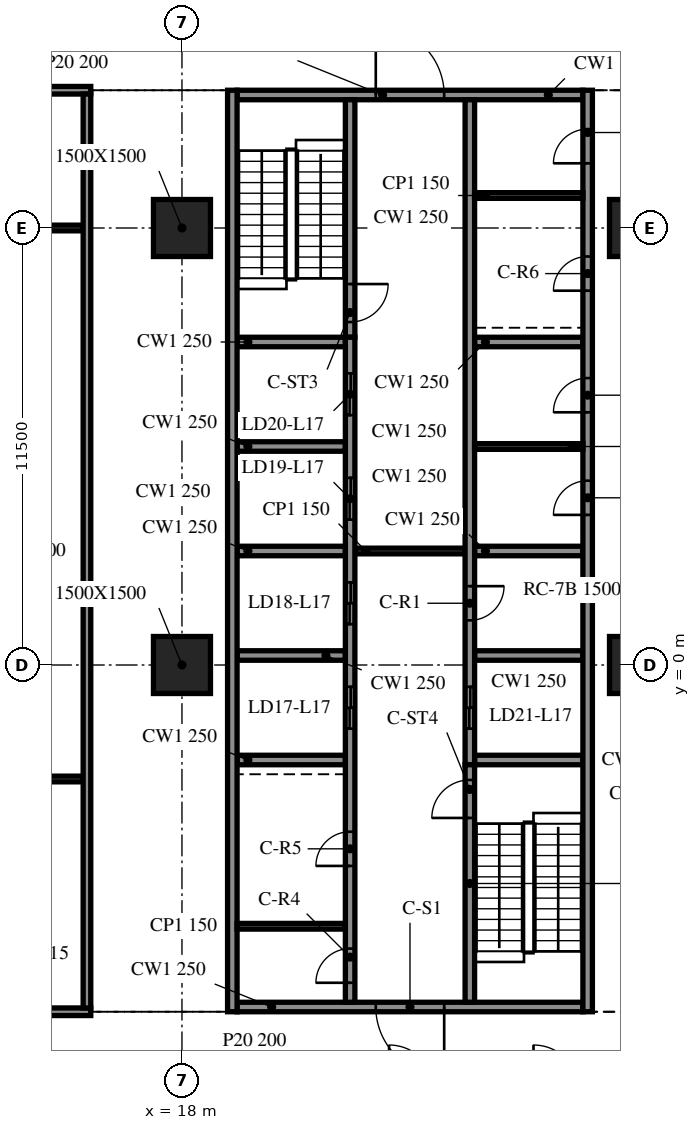
"""IFC4 building model, lengths in metres.
Left out: names, types, materials, properties, quantities, classifications, styles, units other than length and angle.
Written with IfcOpenShell. Run it as: python <this file> out.ifc"""

import sys

from ifc_helpers import new_model, si_unit, direction, frame, frame_2d, origin, origin_2d, place, context, subcontext, project, spatial, rectangle, extrude, element, fill, save


model = new_model("IFC4")
c1 = context("Model", 3, precision=1e-05, world=origin(), true_north=direction((0.0, 1.0)))
c2 = subcontext(c1, "Body", "Model", "MODEL_VIEW")
j1 = project(units=[si_unit("LENGTHUNIT", "METRE"), si_unit("PLANEANGLEUNIT", "RADIAN")], contexts=[c1])
p1 = place(None, origin())
s1 = spatial("IfcSite", under=j1, at=p1, CompositionType="ELEMENT")
p2 = place(p1, origin())
s2 = spatial("IfcBuilding", under=s1, at=p2, CompositionType="ELEMENT")
p3 = place(p2, frame((0.0, 0.0, 76.1)))
s3 = spatial("IfcBuildingStorey", under=s2, at=p3, CompositionType="ELEMENT", Elevation=76.1)
for number, where, z_axis, x_axis in (
    (1, (18.0, 0.0, -0.34), (0.0, 0.0, 1.0), (1.0, 0.0, 0.0)),
    (2, (18.0, 11.5, -0.34), (0.0, 0.0, 1.0), (1.0, 0.0, 0.0)),
    (3, (30.0, 0.0, -0.34), (0.0, 0.0, 1.0), (1.0, 0.0, 0.0)),
    (4, (30.0, 11.5, -0.34), (0.0, 0.0, 1.0), (1.0, 0.0, 0.0)),
):
    element("IfcColumn", number, at=place(p3, frame(where, z_axis=z_axis, x_axis=x_axis)), inside=s3, PredefinedType="COLUMN", context=c2, shape_type="SweptSolid", body=[
        extrude(rectangle(XDim=1.5, YDim=1.5, at=origin_2d()), origin(), (0.0, 0.0, 1.0), 4.09),
    ])
p4 = place(p3, frame((19.325, 15.125, 0.0), z_axis=(0.0, 0.0, 1.0), x_axis=(0.0, -1.0, 0.0)))
e5 = element("IfcWall", 5, at=p4, inside=s3, PredefinedType="SOLIDWALL", context=c2, shape_type="SweptSolid", body=[
    extrude(rectangle(XDim=24.25, YDim=0.25, at=frame_2d((12.125, 0.0))), origin(), (0.0, 0.0, 1.0), 3.75),
])
p5 = place(p3, frame((28.675, -9.125, 0.0), z_axis=(0.0, 0.0, 1.0), x_axis=(0.0, 1.0, 0.0)))
e6 = element("IfcWall", 6, at=p5, inside=s3, PredefinedType="SOLIDWALL", context=c2, shape_type="SweptSolid", body=[
    extrude(rectangle(XDim=24.25, YDim=0.25, at=frame_2d((12.125, 0.0))), origin(), (0.0, 0.0, 1.0), 3.75),
])
p6 = place(p5, frame((13.075, 0.0, 0.0)))
e7 = element("IfcOpeningElement", 7, at=p6, cuts=e6, PredefinedType="OPENING", context=c2, shape_type="SweptSolid", body=[
    extrude(rectangle(XDim=0.9, YDim=2.1, at=frame_2d((0.45, 1.05))), frame((0.0, 0.135, 0.0), z_axis=(0.0, -1.0, 0.0), x_axis=(1.0, 0.0, 0.0)), (0.0, 0.0, 1.0), 0.27),
])
p7 = place(p5, frame((15.775, 0.0, 0.0)))
e8 = element("IfcOpeningElement", 8, at=p7, cuts=e6, PredefinedType="OPENING", context=c2, shape_type="SweptSolid", body=[
    extrude(rectangle(XDim=0.9, YDim=2.1, at=frame_2d((0.45, 1.05))), frame((0.0, 0.135, 0.0), z_axis=(0.0, -1.0, 0.0), x_axis=(1.0, 0.0, 0.0)), (0.0, 0.0, 1.0), 0.27),
])
p8 = place(p5, frame((18.975, 0.0, 0.0)))
e9 = element("IfcOpeningElement", 9, at=p8, cuts=e6, PredefinedType="OPENING", context=c2, shape_type="SweptSolid", body=[
    extrude(rectangle(XDim=0.9, YDim=2.1, at=frame_2d((0.45, 1.05))), frame((0.0, 0.135, 0.0), z_axis=(0.0, -1.0, 0.0), x_axis=(1.0, 0.0, 0.0)), (0.0, 0.0, 1.0), 0.27),
])
p9 = place(p5, frame((22.327, 0.0, 0.0)))
e10 = element("IfcOpeningElement", 10, at=p9, cuts=e6, PredefinedType="OPENING", context=c2, shape_type="SweptSolid", body=[
    extrude(rectangle(XDim=0.9, YDim=2.1, at=frame_2d((0.45, 1.05))), frame((0.0, 0.135, 0.0), z_axis=(0.0, -1.0, 0.0), x_axis=(1.0, 0.0, 0.0)), (0.0, 0.0, 1.0), 0.27),
])
p10 = place(p3, frame((28.55, -9.0, 0.0), z_axis=(0.0, 0.0, 1.0), x_axis=(-1.0, 0.0, 0.0)))
e11 = element("IfcWall", 11, at=p10, inside=s3, PredefinedType="SOLIDWALL", context=c2, shape_type="SweptSolid", body=[
    extrude(rectangle(XDim=9.1, YDim=0.25, at=frame_2d((4.55, 0.0))), origin(), (0.0, 0.0, 1.0), 3.75),
])
p11 = place(p10, frame((3.65, 0.0, 0.0)))
e12 = element("IfcOpeningElement", 12, at=p11, cuts=e11, PredefinedType="OPENING", context=c2, shape_type="SweptSolid", body=[
    extrude(rectangle(XDim=1.8, YDim=2.1, at=frame_2d((0.9, 1.05))), frame((0.0, 0.135, 0.0), z_axis=(0.0, -1.0, 0.0), x_axis=(1.0, 0.0, 0.0)), (0.0, 0.0, 1.0), 0.27),
])
p12 = place(p3, frame((19.45, 15.0, 0.0), z_axis=(0.0, 0.0, 1.0), x_axis=(1.0, 0.0, 0.0)))
e13 = element("IfcWall", 13, at=p12, inside=s3, PredefinedType="SOLIDWALL", context=c2, shape_type="SweptSolid", body=[
    extrude(rectangle(XDim=9.1, YDim=0.25, at=frame_2d((4.55, 0.0))), origin(), (0.0, 0.0, 1.0), 3.75),
])
p13 = place(p12, frame((3.65, 0.0, 0.0)))
e14 = element("IfcOpeningElement", 14, at=p13, cuts=e13, PredefinedType="OPENING", context=c2, shape_type="SweptSolid", body=[
    extrude(rectangle(XDim=1.8, YDim=2.1, at=frame_2d((0.9, 1.05))), frame((0.0, 0.135, 0.0), z_axis=(0.0, -1.0, 0.0), x_axis=(1.0, 0.0, 0.0)), (0.0, 0.0, 1.0), 0.27),
])
p14 = place(p3, frame((22.425, -8.875, 0.0), z_axis=(0.0, 0.0, 1.0), x_axis=(0.0, 1.0, 0.0)))
e15 = element("IfcWall", 15, at=p14, inside=s3, PredefinedType="SOLIDWALL", context=c2, shape_type="SweptSolid", body=[
    extrude(rectangle(XDim=17.5, YDim=0.25, at=frame_2d((8.75, 0.0))), origin(), (0.0, 0.0, 1.0), 3.75),
])
p15 = place(p14, frame((7.2, 0.0, 0.0)))
e16 = element("IfcOpeningElement", 16, at=p15, cuts=e15, PredefinedType="OPENING", context=c2, shape_type="SweptSolid", body=[
    extrude(rectangle(XDim=1.1, YDim=2.1, at=frame_2d((0.55, 1.05))), frame((0.0, 0.135, 0.0), z_axis=(0.0, -1.0, 0.0), x_axis=(1.0, 0.0, 0.0)), (0.0, 0.0, 1.0), 0.27),
])
p16 = place(p14, frame((9.95, 0.0, 0.0)))
e17 = element("IfcOpeningElement", 17, at=p16, cuts=e15, PredefinedType="OPENING", context=c2, shape_type="SweptSolid", body=[
    extrude(rectangle(XDim=1.1, YDim=2.1, at=frame_2d((0.55, 1.05))), frame((0.0, 0.135, 0.0), z_axis=(0.0, -1.0, 0.0), x_axis=(1.0, 0.0, 0.0)), (0.0, 0.0, 1.0), 0.27),
])
p17 = place(p14, frame((12.7, 0.0, 0.0)))
e18 = element("IfcOpeningElement", 18, at=p17, cuts=e15, PredefinedType="OPENING", context=c2, shape_type="SweptSolid", body=[
    extrude(rectangle(XDim=1.1, YDim=2.1, at=frame_2d((0.55, 1.05))), frame((0.0, 0.135, 0.0), z_axis=(0.0, -1.0, 0.0), x_axis=(1.0, 0.0, 0.0)), (0.0, 0.0, 1.0), 0.27),
])
p18 = place(p14, frame((15.45, 0.0, 0.0)))
e19 = element("IfcOpeningElement", 19, at=p18, cuts=e15, PredefinedType="OPENING", context=c2, shape_type="SweptSolid", body=[
    extrude(rectangle(XDim=1.1, YDim=2.1, at=frame_2d((0.55, 1.05))), frame((0.0, 0.135, 0.0), z_axis=(0.0, -1.0, 0.0), x_axis=(1.0, 0.0, 0.0)), (0.0, 0.0, 1.0), 0.27),
])
p19 = place(p14, frame((0.512, 0.0, 0.0)))
e20 = element("IfcOpeningElement", 20, at=p19, cuts=e15, PredefinedType="OPENING", context=c2, shape_type="SweptSolid", body=[
    extrude(rectangle(XDim=0.9, YDim=2.1, at=frame_2d((0.45, 1.05))), frame((0.0, 0.135, 0.0), z_axis=(0.0, -1.0, 0.0), x_axis=(1.0, 0.0, 0.0)), (0.0, 0.0, 1.0), 0.27),
])
p20 = place(p14, frame((3.587, 0.0, 0.0)))
e21 = element("IfcOpeningElement", 21, at=p20, cuts=e15, PredefinedType="OPENING", context=c2, shape_type="SweptSolid", body=[
    extrude(rectangle(XDim=0.9, YDim=2.1, at=frame_2d((0.45, 1.05))), frame((0.0, 0.135, 0.0), z_axis=(0.0, -1.0, 0.0), x_axis=(1.0, 0.0, 0.0)), (0.0, 0.0, 1.0), 0.27),
])
p21 = place(p3, frame((22.425, 14.875, 0.0), z_axis=(0.0, 0.0, 1.0), x_axis=(0.0, -1.0, 0.0)))
e22 = element("IfcWall", 22, at=p21, inside=s3, PredefinedType="SOLIDWALL", context=c2, shape_type="SweptSolid", body=[
    extrude(rectangle(XDim=6.25, YDim=0.25, at=frame_2d((3.125, 0.0))), origin(), (0.0, 0.0, 1.0), 3.75),
])
p22 = place(p21, frame((4.85, 0.0, 0.0)))
e23 = element("IfcOpeningElement", 23, at=p22, cuts=e22, PredefinedType="OPENING", context=c2, shape_type="SweptSolid", body=[
    extrude(rectangle(XDim=1.0, YDim=2.1, at=frame_2d((0.5, 1.05))), frame((0.0, 0.135, 0.0), z_axis=(0.0, -1.0, 0.0), x_axis=(1.0, 0.0, 0.0)), (0.0, 0.0, 1.0), 0.27),
])
p23 = place(p3, frame((25.575, -8.875, 0.0), z_axis=(0.0, 0.0, 1.0), x_axis=(0.0, 1.0, 0.0)))
e24 = element("IfcWall", 24, at=p23, inside=s3, PredefinedType="SOLIDWALL", context=c2, shape_type="SweptSolid", body=[
    extrude(rectangle(XDim=6.25, YDim=0.25, at=frame_2d((3.125, 0.0))), origin(), (0.0, 0.0, 1.0), 3.75),
])
p24 = place(p23, frame((4.85, 0.0, 0.0)))
e25 = element("IfcOpeningElement", 25, at=p24, cuts=e24, PredefinedType="OPENING", context=c2, shape_type="SweptSolid", body=[
    extrude(rectangle(XDim=1.0, YDim=2.1, at=frame_2d((0.5, 1.05))), frame((0.0, 0.135, 0.0), z_axis=(0.0, -1.0, 0.0), x_axis=(1.0, 0.0, 0.0)), (0.0, 0.0, 1.0), 0.27),
])
p25 = place(p3, frame((25.575, 14.875, 0.0), z_axis=(0.0, 0.0, 1.0), x_axis=(0.0, -1.0, 0.0)))
e26 = element("IfcWall", 26, at=p25, inside=s3, PredefinedType="SOLIDWALL", context=c2, shape_type="SweptSolid", body=[
    extrude(rectangle(XDim=17.5, YDim=0.25, at=frame_2d((8.75, 0.0))), origin(), (0.0, 0.0, 1.0), 3.75),
])
p26 = place(p25, frame((15.45, 0.0, 0.0)))
e27 = element("IfcOpeningElement", 27, at=p26, cuts=e26, PredefinedType="OPENING", context=c2, shape_type="SweptSolid", body=[
    extrude(rectangle(XDim=1.1, YDim=2.1, at=frame_2d((0.55, 1.05))), frame((0.0, 0.135, 0.0), z_axis=(0.0, -1.0, 0.0), x_axis=(1.0, 0.0, 0.0)), (0.0, 0.0, 1.0), 0.27),
])
p27 = place(p25, frame((12.8, 0.0, 0.0)))
e28 = element("IfcOpeningElement", 28, at=p27, cuts=e26, PredefinedType="OPENING", context=c2, shape_type="SweptSolid", body=[
    extrude(rectangle(XDim=0.9, YDim=2.1, at=frame_2d((0.45, 1.05))), frame((0.0, 0.135, 0.0), z_axis=(0.0, -1.0, 0.0), x_axis=(1.0, 0.0, 0.0)), (0.0, 0.0, 1.0), 0.27),
])
for number, where, z_axis, x_axis in (
    (29, (19.45, -2.5, 0.0), (0.0, 0.0, 1.0), (1.0, 0.0, 0.0)),
    (30, (19.45, 0.25, 0.0), (0.0, 0.0, 1.0), (1.0, 0.0, 0.0)),
    (31, (19.45, 3.0, 0.0), (0.0, 0.0, 1.0), (1.0, 0.0, 0.0)),
    (32, (19.45, 5.75, 0.0), (0.0, 0.0, 1.0), (1.0, 0.0, 0.0)),
    (33, (19.45, 8.5, 0.0), (0.0, 0.0, 1.0), (1.0, 0.0, 0.0)),
    (34, (25.7, -2.5, 0.0), (0.0, 0.0, 1.0), (1.0, 0.0, 0.0)),
    (35, (25.7, 0.25, 0.0), (0.0, 0.0, 1.0), (1.0, 0.0, 0.0)),
    (36, (25.7, 3.0, 0.0), (0.0, 0.0, 1.0), (1.0, 0.0, 0.0)),
    (37, (25.7, 8.5, 0.0), (0.0, 0.0, 1.0), (1.0, 0.0, 0.0)),
):
    element("IfcWall", number, at=place(p3, frame(where, z_axis=z_axis, x_axis=x_axis)), inside=s3, PredefinedType="SOLIDWALL", context=c2, shape_type="SweptSolid", body=[
        extrude(rectangle(XDim=2.85, YDim=0.25, at=frame_2d((1.425, 0.0))), origin(), (0.0, 0.0, 1.0), 3.75),
    ])
p28 = place(p3, frame((22.55, 3.0, 0.0), z_axis=(0.0, 0.0, 1.0), x_axis=(1.0, 0.0, 0.0)))
e38 = element("IfcWall", 38, at=p28, inside=s3, PredefinedType="PARTITIONING", context=c2, shape_type="SweptSolid", body=[
    extrude(rectangle(XDim=2.9, YDim=0.15, at=frame_2d((1.45, 0.0))), origin(), (0.0, 0.0, 1.0), 3.75),
])
for number, where, z_axis, x_axis in (
    (39, (25.7, 5.75, 0.0), (0.0, 0.0, 1.0), (1.0, 0.0, 0.0)),
    (40, (19.45, -6.875, 0.0), (0.0, 0.0, 1.0), (1.0, 0.0, 0.0)),
    (41, (25.7, 12.355, 0.0), (0.0, 0.0, 1.0), (1.0, 0.0, 0.0)),
):
    element("IfcWall", number, at=place(p3, frame(where, z_axis=z_axis, x_axis=x_axis)), inside=s3, PredefinedType="PARTITIONING", context=c2, shape_type="SweptSolid", body=[
        extrude(rectangle(XDim=2.85, YDim=0.15, at=frame_2d((1.425, 0.0))), origin(), (0.0, 0.0, 1.0), 3.75),
    ])
p29 = place(p3, frame((8.3, -9.125, 0.0), z_axis=(0.0, 0.0, 1.0), x_axis=(1.0, 0.0, 0.0)))
e42 = element("IfcWall", 42, at=p29, inside=s3, PredefinedType="PARTITIONING", context=c2, shape_type="SweptSolid", body=[
    extrude(rectangle(XDim=7.3, YDim=0.2, at=frame_2d((3.65, 0.0))), origin(), (0.0, 0.0, 1.0), 3.75),
])
p30 = place(p29, frame((3.1, 0.0, 0.0)))
e43 = element("IfcOpeningElement", 43, at=p30, cuts=e42, PredefinedType="OPENING", context=c2, shape_type="SweptSolid", body=[
    extrude(rectangle(XDim=1.0, YDim=2.1, at=frame_2d((0.5, 1.05))), frame((0.0, 0.11, 0.0), z_axis=(0.0, -1.0, 0.0), x_axis=(1.0, 0.0, 0.0)), (0.0, 0.0, 1.0), 0.22),
])
for number, where, z_axis, x_axis in (
    (44, (8.5, -3.0, 0.0), (0.0, 0.0, 1.0), (1.0, 0.0, 0.0)),
    (45, (8.5, 11.5, 0.0), (0.0, 0.0, 1.0), (1.0, 0.0, 0.0)),
):
    element("IfcWall", number, at=place(p3, frame(where, z_axis=z_axis, x_axis=x_axis)), inside=s3, PredefinedType="PARTITIONING", context=c2, shape_type="SweptSolid", body=[
        extrude(rectangle(XDim=6.9, YDim=0.15, at=frame_2d((3.45, 0.0))), origin(), (0.0, 0.0, 1.0), 3.75),
    ])
p31 = place(p3, frame((8.3, 15.125, 0.0), z_axis=(0.0, 0.0, 1.0), x_axis=(1.0, 0.0, 0.0)))
e46 = element("IfcWall", 46, at=p31, inside=s3, PredefinedType="PARTITIONING", context=c2, shape_type="SweptSolid", body=[
    extrude(rectangle(XDim=7.3, YDim=0.2, at=frame_2d((3.65, 0.0))), origin(), (0.0, 0.0, 1.0), 3.75),
])
p32 = place(p31, frame((3.1, 0.0, 0.0)))
e47 = element("IfcOpeningElement", 47, at=p32, cuts=e46, PredefinedType="OPENING", context=c2, shape_type="SweptSolid", body=[
    extrude(rectangle(XDim=1.0, YDim=2.1, at=frame_2d((0.5, 1.05))), frame((0.0, 0.11, 0.0), z_axis=(0.0, -1.0, 0.0), x_axis=(1.0, 0.0, 0.0)), (0.0, 0.0, 1.0), 0.22),
])
p33 = place(p3, frame((15.5, -9.025, 0.0), z_axis=(0.0, 0.0, 1.0), x_axis=(0.0, 1.0, 0.0)))
e48 = element("IfcWall", 48, at=p33, inside=s3, PredefinedType="PARTITIONING", context=c2, shape_type="SweptSolid", body=[
    extrude(rectangle(XDim=24.05, YDim=0.2, at=frame_2d((12.025, 0.0))), origin(), (0.0, 0.0, 1.0), 3.75),
])
p34 = place(p11, origin())
e49 = element("IfcDoor", 49, at=p34, inside=s3, OperationType="DOUBLE_DOOR_SINGLE_SWING", PredefinedType="DOOR", context=c2, shape_type="SweptSolid", body=[
    extrude(rectangle(XDim=1.8, YDim=2.1, at=frame_2d((0.9, 1.05))), frame((0.0, 0.025, 0.0), z_axis=(0.0, -1.0, 0.0), x_axis=(1.0, 0.0, 0.0)), (0.0, 0.0, 1.0), 0.05),
])
fill(e12, e49)
p35 = place(p13, origin())
e50 = element("IfcDoor", 50, at=p35, inside=s3, OperationType="DOUBLE_DOOR_SINGLE_SWING", PredefinedType="DOOR", context=c2, shape_type="SweptSolid", body=[
    extrude(rectangle(XDim=1.8, YDim=2.1, at=frame_2d((0.9, 1.05))), frame((0.0, 0.025, 0.0), z_axis=(0.0, -1.0, 0.0), x_axis=(1.0, 0.0, 0.0)), (0.0, 0.0, 1.0), 0.05),
])
fill(e14, e50)
p36 = place(p26, origin())
e51 = element("IfcDoor", 51, at=p36, inside=s3, OperationType="DOUBLE_DOOR_SLIDING", PredefinedType="DOOR", context=c2, shape_type="SweptSolid", body=[
    extrude(rectangle(XDim=1.1, YDim=2.1, at=frame_2d((0.55, 1.05))), frame((0.0, 0.025, 0.0), z_axis=(0.0, -1.0, 0.0), x_axis=(1.0, 0.0, 0.0)), (0.0, 0.0, 1.0), 0.05),
])
fill(e27, e51)
p37 = place(p15, origin())
e52 = element("IfcDoor", 52, at=p37, inside=s3, OperationType="DOUBLE_DOOR_SLIDING", PredefinedType="DOOR", context=c2, shape_type="SweptSolid", body=[
    extrude(rectangle(XDim=1.1, YDim=2.1, at=frame_2d((0.55, 1.05))), frame((0.0, 0.025, 0.0), z_axis=(0.0, -1.0, 0.0), x_axis=(1.0, 0.0, 0.0)), (0.0, 0.0, 1.0), 0.05),
])
fill(e16, e52)
p38 = place(p16, origin())
e53 = element("IfcDoor", 53, at=p38, inside=s3, OperationType="DOUBLE_DOOR_SLIDING", PredefinedType="DOOR", context=c2, shape_type="SweptSolid", body=[
    extrude(rectangle(XDim=1.1, YDim=2.1, at=frame_2d((0.55, 1.05))), frame((0.0, 0.025, 0.0), z_axis=(0.0, -1.0, 0.0), x_axis=(1.0, 0.0, 0.0)), (0.0, 0.0, 1.0), 0.05),
])
fill(e17, e53)
p39 = place(p17, origin())
e54 = element("IfcDoor", 54, at=p39, inside=s3, OperationType="DOUBLE_DOOR_SLIDING", PredefinedType="DOOR", context=c2, shape_type="SweptSolid", body=[
    extrude(rectangle(XDim=1.1, YDim=2.1, at=frame_2d((0.55, 1.05))), frame((0.0, 0.025, 0.0), z_axis=(0.0, -1.0, 0.0), x_axis=(1.0, 0.0, 0.0)), (0.0, 0.0, 1.0), 0.05),
])
fill(e18, e54)
p40 = place(p18, origin())
e55 = element("IfcDoor", 55, at=p40, inside=s3, OperationType="DOUBLE_DOOR_SLIDING", PredefinedType="DOOR", context=c2, shape_type="SweptSolid", body=[
    extrude(rectangle(XDim=1.1, YDim=2.1, at=frame_2d((0.55, 1.05))), frame((0.0, 0.025, 0.0), z_axis=(0.0, -1.0, 0.0), x_axis=(1.0, 0.0, 0.0)), (0.0, 0.0, 1.0), 0.05),
])
fill(e19, e55)
p41 = place(p27, origin())
e56 = element("IfcDoor", 56, at=p41, inside=s3, OperationType="SINGLE_SWING_LEFT", PredefinedType="DOOR", context=c2, shape_type="SweptSolid", body=[
    extrude(rectangle(XDim=0.9, YDim=2.1, at=frame_2d((0.45, 1.05))), frame((0.0, 0.025, 0.0), z_axis=(0.0, -1.0, 0.0), x_axis=(1.0, 0.0, 0.0)), (0.0, 0.0, 1.0), 0.05),
])
fill(e28, e56)
p42 = place(p6, origin())
e57 = element("IfcDoor", 57, at=p42, inside=s3, OperationType="SINGLE_SWING_RIGHT", PredefinedType="DOOR", context=c2, shape_type="SweptSolid", body=[
    extrude(rectangle(XDim=0.9, YDim=2.1, at=frame_2d((0.45, 1.05))), frame((0.0, 0.025, 0.0), z_axis=(0.0, -1.0, 0.0), x_axis=(1.0, 0.0, 0.0)), (0.0, 0.0, 1.0), 0.05),
])
fill(e7, e57)
p43 = place(p7, origin())
e58 = element("IfcDoor", 58, at=p43, inside=s3, OperationType="SINGLE_SWING_LEFT", PredefinedType="DOOR", context=c2, shape_type="SweptSolid", body=[
    extrude(rectangle(XDim=0.9, YDim=2.1, at=frame_2d((0.45, 1.05))), frame((0.0, 0.025, 0.0), z_axis=(0.0, -1.0, 0.0), x_axis=(1.0, 0.0, 0.0)), (0.0, 0.0, 1.0), 0.05),
])
fill(e8, e58)
p44 = place(p19, origin())
e59 = element("IfcDoor", 59, at=p44, inside=s3, OperationType="SINGLE_SWING_RIGHT", PredefinedType="DOOR", context=c2, shape_type="SweptSolid", body=[
    extrude(rectangle(XDim=0.9, YDim=2.1, at=frame_2d((0.45, 1.05))), frame((0.0, 0.025, 0.0), z_axis=(0.0, -1.0, 0.0), x_axis=(1.0, 0.0, 0.0)), (0.0, 0.0, 1.0), 0.05),
])
fill(e20, e59)
p45 = place(p20, origin())
e60 = element("IfcDoor", 60, at=p45, inside=s3, OperationType="SINGLE_SWING_LEFT", PredefinedType="DOOR", context=c2, shape_type="SweptSolid", body=[
    extrude(rectangle(XDim=0.9, YDim=2.1, at=frame_2d((0.45, 1.05))), frame((0.0, 0.025, 0.0), z_axis=(0.0, -1.0, 0.0), x_axis=(1.0, 0.0, 0.0)), (0.0, 0.0, 1.0), 0.05),
])
fill(e21, e60)
p46 = place(p8, origin())
e61 = element("IfcDoor", 61, at=p46, inside=s3, OperationType="SINGLE_SWING_RIGHT", PredefinedType="DOOR", context=c2, shape_type="SweptSolid", body=[
    extrude(rectangle(XDim=0.9, YDim=2.1, at=frame_2d((0.45, 1.05))), frame((0.0, 0.025, 0.0), z_axis=(0.0, -1.0, 0.0), x_axis=(1.0, 0.0, 0.0)), (0.0, 0.0, 1.0), 0.05),
])
fill(e9, e61)
p47 = place(p9, origin())
e62 = element("IfcDoor", 62, at=p47, inside=s3, OperationType="SINGLE_SWING_LEFT", PredefinedType="DOOR", context=c2, shape_type="SweptSolid", body=[
    extrude(rectangle(XDim=0.9, YDim=2.1, at=frame_2d((0.45, 1.05))), frame((0.0, 0.025, 0.0), z_axis=(0.0, -1.0, 0.0), x_axis=(1.0, 0.0, 0.0)), (0.0, 0.0, 1.0), 0.05),
])
fill(e10, e62)
p48 = place(p22, origin())
e63 = element("IfcDoor", 63, at=p48, inside=s3, OperationType="SINGLE_SWING_RIGHT", PredefinedType="DOOR", context=c2, shape_type="SweptSolid", body=[
    extrude(rectangle(XDim=1.0, YDim=2.1, at=frame_2d((0.5, 1.05))), frame((0.0, 0.025, 0.0), z_axis=(0.0, -1.0, 0.0), x_axis=(1.0, 0.0, 0.0)), (0.0, 0.0, 1.0), 0.05),
])
fill(e23, e63)
p49 = place(p24, origin())
e64 = element("IfcDoor", 64, at=p49, inside=s3, OperationType="SINGLE_SWING_LEFT", PredefinedType="DOOR", context=c2, shape_type="SweptSolid", body=[
    extrude(rectangle(XDim=1.0, YDim=2.1, at=frame_2d((0.5, 1.05))), frame((0.0, 0.025, 0.0), z_axis=(0.0, -1.0, 0.0), x_axis=(1.0, 0.0, 0.0)), (0.0, 0.0, 1.0), 0.05),
])
fill(e25, e64)
save(model, sys.argv[1])
